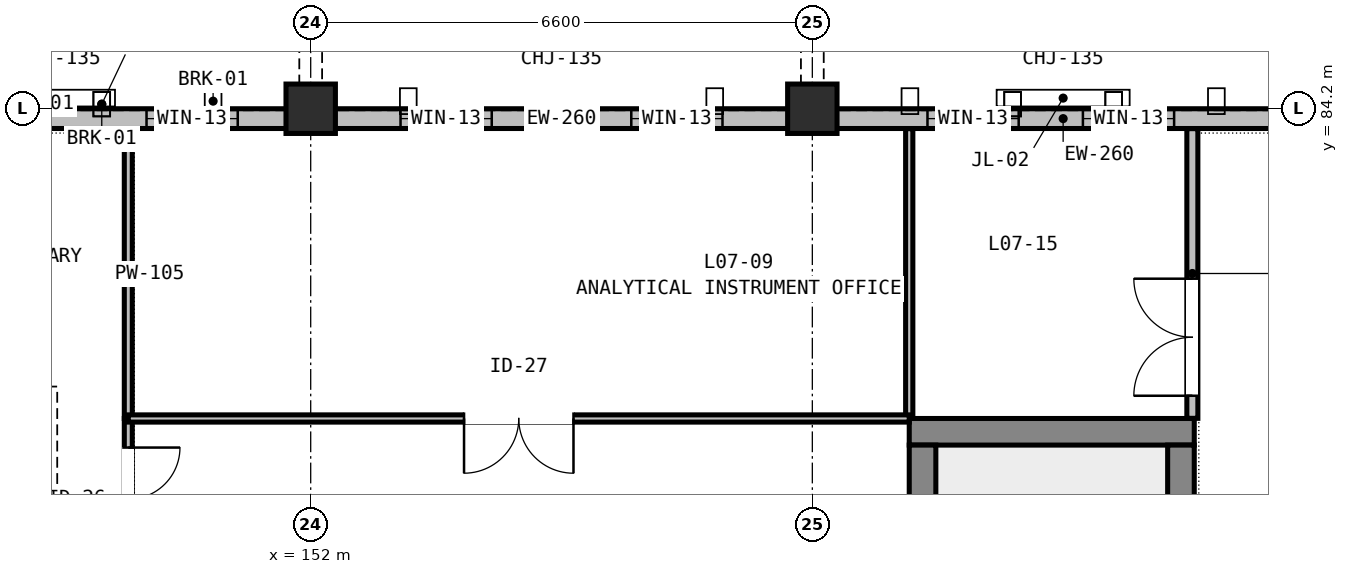
"""IFC4 building model, lengths in metres.
Left out: names, types, materials, properties, quantities, classifications, styles, units other than length and angle.
Written with IfcOpenShell. Run it as: python <this file> out.ifc"""

import sys

from ifc_helpers import new_model, si_unit, direction, frame, frame_2d, origin, origin_2d, place, context, subcontext, project, spatial, rectangle, extrude, element, fill, save


model = new_model("IFC4")
c1 = context("Model", 3, precision=1e-05, world=origin(), true_north=direction((0.0, 1.0)))
c2 = subcontext(c1, "Body", "Model", "MODEL_VIEW")
j1 = project(units=[si_unit("LENGTHUNIT", "METRE"), si_unit("PLANEANGLEUNIT", "RADIAN")], contexts=[c1])
p1 = place(None, origin())
s1 = spatial("IfcSite", under=j1, at=p1, CompositionType="ELEMENT")
p2 = place(p1, origin())
s2 = spatial("IfcBuilding", under=s1, at=p2, CompositionType="ELEMENT")
p3 = place(p2, frame((0.0, 0.0, 32.7)))
s3 = spatial("IfcBuildingStorey", under=s2, at=p3, CompositionType="ELEMENT", Elevation=32.7)
for number, where, z_axis, x_axis in (
    (1, (152.0, 84.2, 0.0), (0.0, 0.0, 1.0), (1.0, 0.0, 0.0)),
    (2, (158.6, 84.2, 0.0), (0.0, 0.0, 1.0), (1.0, 0.0, 0.0)),
):
    element("IfcColumn", number, at=place(p3, frame(where, z_axis=z_axis, x_axis=x_axis)), inside=s3, PredefinedType="COLUMN", context=c2, shape_type="SweptSolid", body=[
        extrude(rectangle(XDim=0.65, YDim=0.65, at=origin_2d()), origin(), (0.0, 0.0, 1.0), 3.9),
    ])
p4 = place(p3, frame((159.875, 79.95, 0.0), z_axis=(0.0, 0.0, 1.0), x_axis=(1.0, 0.0, 0.0)))
e3 = element("IfcWall", 3, at=p4, inside=s3, PredefinedType="SHEAR", context=c2, shape_type="SweptSolid", body=[
    extrude(rectangle(XDim=3.75, YDim=0.35, at=frame_2d((1.875, 0.0))), origin(), (0.0, 0.0, 1.0), 3.9),
])
for number, where, z_axis, x_axis in (
    (4, (160.05, 72.4, 0.0), (0.0, 0.0, 1.0), (0.0, 1.0, 0.0)),
    (5, (163.45, 72.4, 0.0), (0.0, 0.0, 1.0), (0.0, 1.0, 0.0)),
):
    element("IfcWall", number, at=place(p3, frame(where, z_axis=z_axis, x_axis=x_axis)), inside=s3, PredefinedType="SHEAR", context=c2, shape_type="SweptSolid", body=[
        extrude(rectangle(XDim=7.375, YDim=0.35, at=frame_2d((3.688, 0.0))), origin(), (0.0, 0.0, 1.0), 3.9),
    ])
p5 = place(p3, frame((145.4, 84.07, 0.0), z_axis=(0.0, 0.0, 1.0), x_axis=(1.0, 0.0, 0.0)))
e6 = element("IfcWall", 6, at=p5, inside=s3, PredefinedType="STANDARD", context=c2, shape_type="SweptSolid", body=[
    extrude(rectangle(XDim=6.6, YDim=0.26, at=frame_2d((3.3, 0.0))), origin(), (0.0, 0.0, 1.0), 3.185),
])
p6 = place(p5, frame((1.182, 0.0, 0.95)))
e7 = element("IfcOpeningElement", 7, at=p6, cuts=e6, PredefinedType="OPENING", context=c2, shape_type="SweptSolid", body=[
    extrude(rectangle(XDim=1.2, YDim=1.5, at=frame_2d((0.6, 0.75))), frame((0.0, 0.14, 0.0), z_axis=(0.0, -1.0, 0.0), x_axis=(1.0, 0.0, 0.0)), (0.0, 0.0, 1.0), 0.28),
])
p7 = place(p5, frame((4.44, 0.0, 0.95)))
e8 = element("IfcOpeningElement", 8, at=p7, cuts=e6, PredefinedType="OPENING", context=c2, shape_type="SweptSolid", body=[
    extrude(rectangle(XDim=1.2, YDim=1.5, at=frame_2d((0.6, 0.75))), frame((0.0, 0.14, 0.0), z_axis=(0.0, -1.0, 0.0), x_axis=(1.0, 0.0, 0.0)), (0.0, 0.0, 1.0), 0.28),
])
p8 = place(p3, frame((152.0, 84.07, 0.0), z_axis=(0.0, 0.0, 1.0), x_axis=(1.0, 0.0, 0.0)))
e9 = element("IfcWall", 9, at=p8, inside=s3, PredefinedType="STANDARD", context=c2, shape_type="SweptSolid", body=[
    extrude(rectangle(XDim=6.6, YDim=0.26, at=frame_2d((3.3, 0.0))), origin(), (0.0, 0.0, 1.0), 3.185),
])
p9 = place(p8, frame((1.182, 0.0, 0.95)))
e10 = element("IfcOpeningElement", 10, at=p9, cuts=e9, PredefinedType="OPENING", context=c2, shape_type="SweptSolid", body=[
    extrude(rectangle(XDim=1.2, YDim=1.5, at=frame_2d((0.6, 0.75))), frame((0.0, 0.14, 0.0), z_axis=(0.0, -1.0, 0.0), x_axis=(1.0, 0.0, 0.0)), (0.0, 0.0, 1.0), 0.28),
])
p10 = place(p8, frame((4.218, 0.0, 0.95)))
e11 = element("IfcOpeningElement", 11, at=p10, cuts=e9, PredefinedType="OPENING", context=c2, shape_type="SweptSolid", body=[
    extrude(rectangle(XDim=1.2, YDim=1.5, at=frame_2d((0.6, 0.75))), frame((0.0, 0.14, 0.0), z_axis=(0.0, -1.0, 0.0), x_axis=(1.0, 0.0, 0.0)), (0.0, 0.0, 1.0), 0.28),
])
p11 = place(p3, frame((158.6, 84.07, 0.0), z_axis=(0.0, 0.0, 1.0), x_axis=(1.0, 0.0, 0.0)))
e12 = element("IfcWall", 12, at=p11, inside=s3, PredefinedType="STANDARD", context=c2, shape_type="SweptSolid", body=[
    extrude(rectangle(XDim=6.6, YDim=0.26, at=frame_2d((3.3, 0.0))), origin(), (0.0, 0.0, 1.0), 3.185),
])
p12 = place(p11, frame((1.515, 0.0, 0.95)))
e13 = element("IfcOpeningElement", 13, at=p12, cuts=e12, PredefinedType="OPENING", context=c2, shape_type="SweptSolid", body=[
    extrude(rectangle(XDim=1.2, YDim=1.5, at=frame_2d((0.6, 0.75))), frame((0.0, 0.14, 0.0), z_axis=(0.0, -1.0, 0.0), x_axis=(1.0, 0.0, 0.0)), (0.0, 0.0, 1.0), 0.28),
])
p13 = place(p11, frame((3.56, 0.0, 0.95)))
e14 = element("IfcOpeningElement", 14, at=p13, cuts=e12, PredefinedType="OPENING", context=c2, shape_type="SweptSolid", body=[
    extrude(rectangle(XDim=1.2, YDim=1.5, at=frame_2d((0.6, 0.75))), frame((0.0, 0.14, 0.0), z_axis=(0.0, -1.0, 0.0), x_axis=(1.0, 0.0, 0.0)), (0.0, 0.0, 1.0), 0.28),
])
p14 = place(p3, frame((149.6, 83.938, 0.0), z_axis=(0.0, 0.0, 1.0), x_axis=(0.0, -1.0, 0.0)))
e15 = element("IfcWall", 15, at=p14, inside=s3, PredefinedType="PARTITIONING", context=c2, shape_type="SweptSolid", body=[
    extrude(rectangle(XDim=3.813, YDim=0.105, at=frame_2d((1.906, 0.0))), origin(), (0.0, 0.0, 1.0), 3.635),
])
p15 = place(p3, frame((149.6, 80.125, 0.0), z_axis=(0.0, 0.0, 1.0), x_axis=(0.0, -1.0, 0.0)))
e16 = element("IfcWall", 16, at=p15, inside=s3, PredefinedType="PARTITIONING", context=c2, shape_type="SweptSolid", body=[
    extrude(rectangle(XDim=2.125, YDim=0.105, at=frame_2d((1.062, 0.0))), origin(), (0.0, 0.0, 1.0), 3.635),
])
p16 = place(p15, frame((0.383, 0.0, 0.0)))
e17 = element("IfcOpeningElement", 17, at=p16, cuts=e16, PredefinedType="OPENING", context=c2, shape_type="SweptSolid", body=[
    extrude(rectangle(XDim=1.36, YDim=2.14, at=frame_2d((0.68, 1.07))), frame((0.0, 0.062, 0.0), z_axis=(0.0, -1.0, 0.0), x_axis=(1.0, 0.0, 0.0)), (0.0, 0.0, 1.0), 0.125),
])
p17 = place(p3, frame((159.875, 83.938, 0.0), z_axis=(0.0, 0.0, 1.0), x_axis=(0.0, -1.0, 0.0)))
e18 = element("IfcWall", 18, at=p17, inside=s3, PredefinedType="PARTITIONING", context=c2, shape_type="SweptSolid", body=[
    extrude(rectangle(XDim=3.811, YDim=0.095, at=frame_2d((1.906, 0.0))), origin(), (0.0, 0.0, 1.0), 3.635),
])
p18 = place(p3, frame((159.875, 80.125, 0.0), z_axis=(0.0, 0.0, 1.0), x_axis=(-1.0, 0.0, 0.0)))
e19 = element("IfcWall", 19, at=p18, inside=s3, PredefinedType="PARTITIONING", context=c2, shape_type="SweptSolid", body=[
    extrude(rectangle(XDim=10.275, YDim=0.095, at=frame_2d((5.137, 0.0))), origin(), (0.0, 0.0, 1.0), 3.185),
])
p19 = place(p18, frame((4.417, 0.0, 0.0)))
e20 = element("IfcOpeningElement", 20, at=p19, cuts=e19, PredefinedType="OPENING", context=c2, shape_type="SweptSolid", body=[
    extrude(rectangle(XDim=1.44, YDim=2.14, at=frame_2d((0.72, 1.07))), frame((0.0, 0.057, 0.0), z_axis=(0.0, -1.0, 0.0), x_axis=(1.0, 0.0, 0.0)), (0.0, 0.0, 1.0), 0.115),
])
p20 = place(p3, frame((163.6, 80.127, 0.0), z_axis=(0.0, 0.0, 1.0), x_axis=(0.0, 1.0, 0.0)))
e21 = element("IfcWall", 21, at=p20, inside=s3, PredefinedType="PARTITIONING", context=c2, shape_type="SweptSolid", body=[
    extrude(rectangle(XDim=3.811, YDim=0.145, at=frame_2d((1.906, 0.0))), origin(), (0.0, 0.0, 1.0), 3.335),
])
p21 = place(p20, frame((0.297, 0.0, 0.0)))
e22 = element("IfcOpeningElement", 22, at=p21, cuts=e21, PredefinedType="OPENING", context=c2, shape_type="SweptSolid", body=[
    extrude(rectangle(XDim=1.54, YDim=2.2, at=frame_2d((0.77, 1.1))), frame((0.0, 0.083, 0.0), z_axis=(0.0, -1.0, 0.0), x_axis=(1.0, 0.0, 0.0)), (0.0, 0.0, 1.0), 0.165),
])
p22 = place(p7, origin())
e23 = element("IfcWindow", 23, at=p22, inside=s3, PartitioningType="SINGLE_PANEL", PredefinedType="WINDOW", context=c2, shape_type="SweptSolid", body=[
    extrude(rectangle(XDim=1.2, YDim=1.5, at=frame_2d((0.6, 0.75))), frame((0.0, 0.03, 0.0), z_axis=(0.0, -1.0, 0.0), x_axis=(1.0, 0.0, 0.0)), (0.0, 0.0, 1.0), 0.06),
])
fill(e8, e23)
p23 = place(p9, origin())
e24 = element("IfcWindow", 24, at=p23, inside=s3, PartitioningType="SINGLE_PANEL", PredefinedType="WINDOW", context=c2, shape_type="SweptSolid", body=[
    extrude(rectangle(XDim=1.2, YDim=1.5, at=frame_2d((0.6, 0.75))), frame((0.0, 0.03, 0.0), z_axis=(0.0, -1.0, 0.0), x_axis=(1.0, 0.0, 0.0)), (0.0, 0.0, 1.0), 0.06),
])
fill(e10, e24)
p24 = place(p10, origin())
e25 = element("IfcWindow", 25, at=p24, inside=s3, PartitioningType="SINGLE_PANEL", PredefinedType="WINDOW", context=c2, shape_type="SweptSolid", body=[
    extrude(rectangle(XDim=1.2, YDim=1.5, at=frame_2d((0.6, 0.75))), frame((0.0, 0.03, 0.0), z_axis=(0.0, -1.0, 0.0), x_axis=(1.0, 0.0, 0.0)), (0.0, 0.0, 1.0), 0.06),
])
fill(e11, e25)
p25 = place(p12, origin())
e26 = element("IfcWindow", 26, at=p25, inside=s3, PartitioningType="SINGLE_PANEL", PredefinedType="WINDOW", context=c2, shape_type="SweptSolid", body=[
    extrude(rectangle(XDim=1.2, YDim=1.5, at=frame_2d((0.6, 0.75))), frame((0.0, 0.03, 0.0), z_axis=(0.0, -1.0, 0.0), x_axis=(1.0, 0.0, 0.0)), (0.0, 0.0, 1.0), 0.06),
])
fill(e13, e26)
p26 = place(p13, origin())
e27 = element("IfcWindow", 27, at=p26, inside=s3, PartitioningType="SINGLE_PANEL", PredefinedType="WINDOW", context=c2, shape_type="SweptSolid", body=[
    extrude(rectangle(XDim=1.2, YDim=1.5, at=frame_2d((0.6, 0.75))), frame((0.0, 0.03, 0.0), z_axis=(0.0, -1.0, 0.0), x_axis=(1.0, 0.0, 0.0)), (0.0, 0.0, 1.0), 0.06),
])
fill(e14, e27)
p27 = place(p16, origin())
e28 = element("IfcDoor", 28, at=p27, inside=s3, OperationType="DOUBLE_DOOR_SINGLE_SWING", PredefinedType="DOOR", context=c2, shape_type="SweptSolid", body=[
    extrude(rectangle(XDim=1.36, YDim=2.14, at=frame_2d((0.68, 1.07))), frame((0.0, 0.025, 0.0), z_axis=(0.0, -1.0, 0.0), x_axis=(1.0, 0.0, 0.0)), (0.0, 0.0, 1.0), 0.05),
])
fill(e17, e28)
p28 = place(p19, origin())
e29 = element("IfcDoor", 29, at=p28, inside=s3, OperationType="DOUBLE_DOOR_SINGLE_SWING", PredefinedType="DOOR", context=c2, shape_type="SweptSolid", body=[
    extrude(rectangle(XDim=1.44, YDim=2.14, at=frame_2d((0.72, 1.07))), frame((0.0, 0.025, 0.0), z_axis=(0.0, -1.0, 0.0), x_axis=(1.0, 0.0, 0.0)), (0.0, 0.0, 1.0), 0.05),
])
fill(e20, e29)
p29 = place(p21, origin())
e30 = element("IfcDoor", 30, at=p29, inside=s3, OperationType="DOUBLE_DOOR_SINGLE_SWING", PredefinedType="DOOR", context=c2, shape_type="SweptSolid", body=[
    extrude(rectangle(XDim=1.54, YDim=2.2, at=frame_2d((0.77, 1.1))), frame((0.0, 0.025, 0.0), z_axis=(0.0, -1.0, 0.0), x_axis=(1.0, 0.0, 0.0)), (0.0, 0.0, 1.0), 0.05),
])
fill(e22, e30)
save(model, sys.argv[1])
